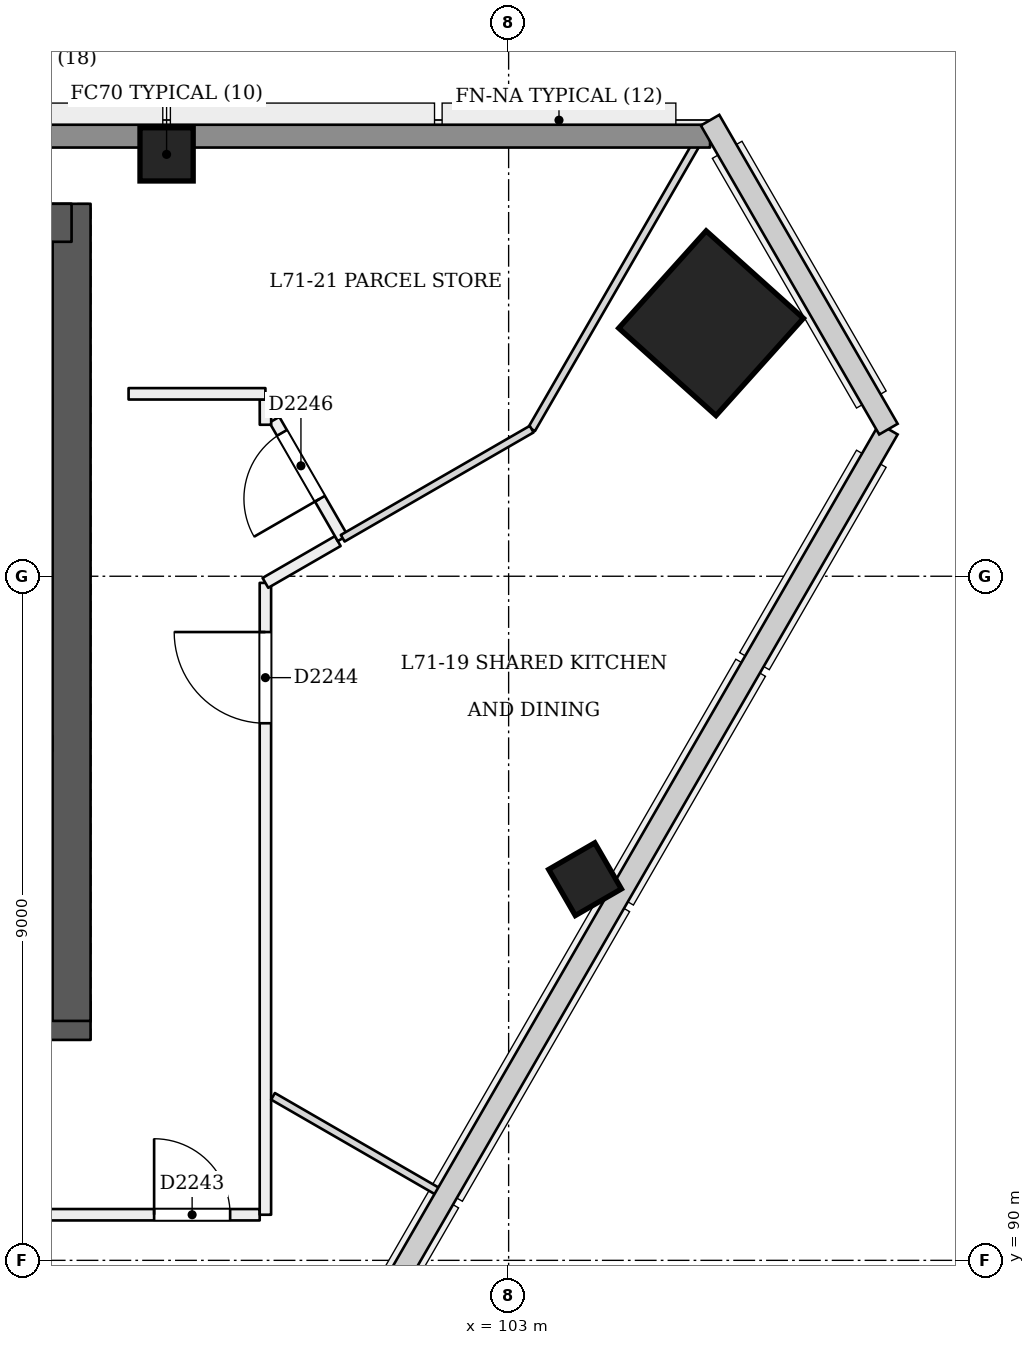
"""IFC4 building model, lengths in metres.
Left out: names, types, materials, properties, quantities, classifications, styles, units other than length and angle.
Written with IfcOpenShell. Run it as: python <this file> out.ifc"""

import sys

from ifc_helpers import new_model, si_unit, direction, frame, frame_2d, origin, origin_2d, place, context, subcontext, project, spatial, rectangle, extrude, element, fill, save


model = new_model("IFC4")
c1 = context("Model", 3, precision=1e-05, world=origin(), true_north=direction((0.0, 1.0)))
c2 = subcontext(c1, "Body", "Model", "MODEL_VIEW")
j1 = project(units=[si_unit("LENGTHUNIT", "METRE"), si_unit("PLANEANGLEUNIT", "RADIAN")], contexts=[c1])
p1 = place(None, origin())
s1 = spatial("IfcSite", under=j1, at=p1, CompositionType="ELEMENT")
p2 = place(p1, origin())
s2 = spatial("IfcBuilding", under=s1, at=p2, CompositionType="ELEMENT")
p3 = place(p2, frame((0.0, 0.0, 275.2)))
s3 = spatial("IfcBuildingStorey", under=s2, at=p3, CompositionType="ELEMENT", Elevation=275.2)
p4 = place(p3, frame((72.75, 93.15, 0.0), z_axis=(0.0, 0.0, 1.0), x_axis=(1.0, 0.0, 0.0)))
e1 = element("IfcWall", 1, at=p4, inside=s3, PredefinedType="SHEAR", context=c2, shape_type="SweptSolid", body=[
    extrude(rectangle(XDim=24.75, YDim=0.5, at=frame_2d((12.375, 0.0))), origin(), (0.0, 0.0, 1.0), 3.6),
])
p5 = place(p4, frame((1.05, 0.0, 0.0)))
e2 = element("IfcOpeningElement", 2, at=p5, cuts=e1, PredefinedType="OPENING", context=c2, shape_type="SweptSolid", body=[
    extrude(rectangle(XDim=1.2, YDim=2.1, at=frame_2d((0.6, 1.05))), frame((0.0, 0.26, 0.0), z_axis=(0.0, -1.0, 0.0), x_axis=(1.0, 0.0, 0.0)), (0.0, 0.0, 1.0), 0.521),
])
p6 = place(p4, frame((3.25, 0.0, 0.0)))
e3 = element("IfcOpeningElement", 3, at=p6, cuts=e1, PredefinedType="OPENING", context=c2, shape_type="SweptSolid", body=[
    extrude(rectangle(XDim=1.2, YDim=2.1, at=frame_2d((0.6, 1.05))), frame((0.0, 0.26, 0.0), z_axis=(0.0, -1.0, 0.0), x_axis=(1.0, 0.0, 0.0)), (0.0, 0.0, 1.0), 0.521),
])
p7 = place(p4, frame((13.25, 0.0, 0.0)))
e4 = element("IfcOpeningElement", 4, at=p7, cuts=e1, PredefinedType="OPENING", context=c2, shape_type="SweptSolid", body=[
    extrude(rectangle(XDim=1.2, YDim=2.1, at=frame_2d((0.6, 1.05))), frame((0.0, 0.26, 0.0), z_axis=(0.0, -1.0, 0.0), x_axis=(1.0, 0.0, 0.0)), (0.0, 0.0, 1.0), 0.521),
])
p8 = place(p4, frame((15.312, 0.0, 0.0)))
e5 = element("IfcOpeningElement", 5, at=p8, cuts=e1, PredefinedType="OPENING", context=c2, shape_type="SweptSolid", body=[
    extrude(rectangle(XDim=1.0, YDim=2.1, at=frame_2d((0.5, 1.05))), frame((0.0, 0.26, 0.0), z_axis=(0.0, -1.0, 0.0), x_axis=(1.0, 0.0, 0.0)), (0.0, 0.0, 1.0), 0.521),
])
p9 = place(p4, frame((17.55, 0.0, 0.0)))
e6 = element("IfcOpeningElement", 6, at=p9, cuts=e1, PredefinedType="OPENING", context=c2, shape_type="SweptSolid", body=[
    extrude(rectangle(XDim=1.0, YDim=2.1, at=frame_2d((0.5, 1.05))), frame((0.0, 0.26, 0.0), z_axis=(0.0, -1.0, 0.0), x_axis=(1.0, 0.0, 0.0)), (0.0, 0.0, 1.0), 0.521),
])
p10 = place(p4, frame((20.1, 0.0, 0.0)))
e7 = element("IfcOpeningElement", 7, at=p10, cuts=e1, PredefinedType="OPENING", context=c2, shape_type="SweptSolid", body=[
    extrude(rectangle(XDim=1.0, YDim=2.1, at=frame_2d((0.5, 1.05))), frame((0.0, 0.26, 0.0), z_axis=(0.0, -1.0, 0.0), x_axis=(1.0, 0.0, 0.0)), (0.0, 0.0, 1.0), 0.521),
])
p11 = place(p4, frame((22.587, 0.0, 0.0)))
e8 = element("IfcOpeningElement", 8, at=p11, cuts=e1, PredefinedType="OPENING", context=c2, shape_type="SweptSolid", body=[
    extrude(rectangle(XDim=1.0, YDim=2.1, at=frame_2d((0.5, 1.05))), frame((0.0, 0.26, 0.0), z_axis=(0.0, -1.0, 0.0), x_axis=(1.0, 0.0, 0.0)), (0.0, 0.0, 1.0), 0.521),
])
p12 = place(p3, frame((97.25, 93.15, 0.0), z_axis=(0.0, 0.0, 1.0), x_axis=(0.0, 1.0, 0.0)))
e9 = element("IfcWall", 9, at=p12, inside=s3, PredefinedType="SHEAR", context=c2, shape_type="SweptSolid", body=[
    extrude(rectangle(XDim=10.75, YDim=0.5, at=frame_2d((5.375, 0.0))), origin(), (0.0, 0.0, 1.0), 3.6),
])
p13 = place(p3, frame((97.25, 103.65, 0.0), z_axis=(0.0, 0.0, 1.0), x_axis=(-1.0, 0.0, 0.0)))
e10 = element("IfcWall", 10, at=p13, inside=s3, PredefinedType="SHEAR", context=c2, shape_type="SweptSolid", body=[
    extrude(rectangle(XDim=24.75, YDim=0.5, at=frame_2d((12.375, 0.0))), origin(), (0.0, 0.0, 1.0), 3.6),
])
p14 = place(p3, frame((105.698, 102.318, 0.0), z_axis=(-0.028401796786, 0.009286506348, 0.999553449666), x_axis=(0.498883874229, -0.866383828461, 0.022224801831)))
e11 = element("IfcColumn", 11, at=p14, inside=s3, PredefinedType="COLUMN", context=c2, shape_type="SweptSolid", body=[
    extrude(rectangle(XDim=1.72, YDim=1.72, at=origin_2d()), origin(), (0.0, 0.0, 1.0), 3.602),
])
p15 = place(p3, frame((98.5, 104.55, 0.0), z_axis=(0.0, 0.0, 1.0), x_axis=(1.0, 0.0, 0.0)))
e12 = element("IfcColumn", 12, at=p15, inside=s3, PredefinedType="COLUMN", context=c2, shape_type="SweptSolid", body=[
    extrude(rectangle(XDim=0.7, YDim=0.7, at=origin_2d()), origin(), (0.0, 0.0, 1.0), 3.6),
])
p16 = place(p3, frame((104.032, 94.968, -0.021), z_axis=(-0.022221406801, 0.038413224561, 0.999014831351), x_axis=(-0.499512955973, -0.866022210505, 0.022188684646)))
e13 = element("IfcColumn", 13, at=p16, inside=s3, PredefinedType="COLUMN", context=c2, shape_type="SweptSolid", body=[
    extrude(rectangle(XDim=0.7, YDim=0.7, at=origin_2d()), origin(), (0.0, 0.0, 1.0), 3.604),
])
p17 = place(p3, frame((94.524, 90.6, 0.0), z_axis=(0.0, 0.0, 1.0), x_axis=(1.0, 0.0, 0.0)))
e14 = element("IfcWall", 14, at=p17, inside=s3, PredefinedType="PARTITIONING", context=c2, shape_type="SweptSolid", body=[
    extrude(rectangle(XDim=5.201, YDim=0.15, at=frame_2d((2.601, 0.0))), origin(), (0.0, 0.0, 1.0), 3.2),
])
p18 = place(p17, frame((3.812, 0.0, 0.0)))
e15 = element("IfcOpeningElement", 15, at=p18, cuts=e14, PredefinedType="OPENING", context=c2, shape_type="SweptSolid", body=[
    extrude(rectangle(XDim=1.0, YDim=2.1, at=frame_2d((0.5, 1.05))), frame((0.0, 0.085, 0.0), z_axis=(0.0, -1.0, 0.0), x_axis=(1.0, 0.0, 0.0)), (0.0, 0.0, 1.0), 0.171),
])
p19 = place(p3, frame((99.8, 90.6, 0.0), z_axis=(0.0, 0.0, 1.0), x_axis=(0.0, 1.0, 0.0)))
e16 = element("IfcWall", 16, at=p19, inside=s3, PredefinedType="PARTITIONING", context=c2, shape_type="SweptSolid", body=[
    extrude(rectangle(XDim=8.313, YDim=0.15, at=frame_2d((4.156, 0.0))), origin(), (0.0, 0.0, 1.0), 3.2),
])
p20 = place(p19, frame((6.466, 0.0, 0.0)))
e17 = element("IfcOpeningElement", 17, at=p20, cuts=e16, PredefinedType="OPENING", context=c2, shape_type="SweptSolid", body=[
    extrude(rectangle(XDim=1.2, YDim=2.1, at=frame_2d((0.6, 1.05))), frame((0.0, 0.085, 0.0), z_axis=(0.0, -1.0, 0.0), x_axis=(1.0, 0.0, 0.0)), (0.0, 0.0, 1.0), 0.171),
])
p21 = place(p3, frame((99.8, 98.913, 0.0), z_axis=(0.0, 0.0, 1.0), x_axis=(0.866089444669, 0.499889061526, 0.0)))
e18 = element("IfcWall", 18, at=p21, inside=s3, PredefinedType="PARTITIONING", context=c2, shape_type="SweptSolid", body=[
    extrude(rectangle(XDim=1.099, YDim=0.15, at=frame_2d((0.55, 0.0))), origin(), (0.0, 0.0, 1.0), 3.2),
])
p22 = place(p3, frame((100.817, 99.5, 0.0), z_axis=(0.0, 0.0, 1.0), x_axis=(-0.499538486351, 0.866291694901, 0.0)))
e19 = element("IfcWall", 19, at=p22, inside=s3, PredefinedType="PARTITIONING", context=c2, shape_type="SweptSolid", body=[
    extrude(rectangle(XDim=1.8, YDim=0.15, at=frame_2d((0.9, 0.0))), origin(), (0.0, 0.0, 1.0), 3.2),
])
p23 = place(p22, frame((0.6, 0.0, 0.0)))
e20 = element("IfcOpeningElement", 20, at=p23, cuts=e19, PredefinedType="OPENING", context=c2, shape_type="SweptSolid", body=[
    extrude(rectangle(XDim=1.0, YDim=2.1, at=frame_2d((0.5, 1.05))), frame((0.0, 0.085, 0.0), z_axis=(0.0, -1.0, 0.0), x_axis=(1.0, 0.0, 0.0)), (0.0, 0.0, 1.0), 0.171),
])
p24 = place(p3, frame((99.801, 100.993, 0.0), z_axis=(0.0, 0.0, 1.0), x_axis=(-0.002205876986, 0.99999756705, 0.0)))
e21 = element("IfcWall", 21, at=p24, inside=s3, PredefinedType="PARTITIONING", context=c2, shape_type="SweptSolid", body=[
    extrude(rectangle(XDim=0.332, YDim=0.15, at=frame_2d((0.166, 0.0))), origin(), (0.0, 0.0, 1.0), 3.2),
])
p25 = place(p3, frame((99.8, 101.4, 0.0), z_axis=(0.0, 0.0, 1.0), x_axis=(-1.0, 0.0, 0.0)))
e22 = element("IfcWall", 22, at=p25, inside=s3, PredefinedType="PARTITIONING", context=c2, shape_type="SweptSolid", body=[
    extrude(rectangle(XDim=1.8, YDim=0.15, at=frame_2d((0.9, 0.0))), origin(), (0.0, 0.0, 1.0), 3.2),
])
p26 = place(p3, frame((99.835, 86.999, 0.0), z_axis=(0.0, 0.0, 1.0), x_axis=(-0.866025537322, 0.499999768706, 0.0)))
e23 = element("IfcWall", 23, at=p26, inside=s3, PredefinedType="PARTITIONING", context=c2, shape_type="SweptSolid", body=[
    extrude(rectangle(XDim=6.325, YDim=0.1, at=frame_2d((3.163, 0.0))), origin(), (0.0, 0.0, 1.0), 2.7),
])
p27 = place(p3, frame((102.103, 90.886, 0.0), z_axis=(0.0, 0.0, 1.0), x_axis=(-0.866060904967, 0.499938505106, 0.0)))
e24 = element("IfcWall", 24, at=p27, inside=s3, PredefinedType="PARTITIONING", context=c2, shape_type="SweptSolid", body=[
    extrude(rectangle(XDim=2.543, YDim=0.1, at=frame_2d((1.271, 0.0))), origin(), (0.0, 0.0, 1.0), 2.7),
])
p28 = place(p3, frame((105.592, 104.9, 0.0), z_axis=(0.0, 0.0, 1.0), x_axis=(-0.500016357846, -0.866015959371, 0.0)))
e25 = element("IfcWall", 25, at=p28, inside=s3, PredefinedType="PARTITIONING", context=c2, shape_type="SweptSolid", body=[
    extrude(rectangle(XDim=4.578, YDim=0.1, at=frame_2d((2.289, 0.0))), origin(), (0.0, 0.0, 1.0), 2.7),
])
p29 = place(p3, frame((103.303, 100.935, 0.0), z_axis=(0.0, 0.0, 1.0), x_axis=(-0.866031214595, -0.499989935246, 0.0)))
e26 = element("IfcWall", 26, at=p29, inside=s3, PredefinedType="PARTITIONING", context=c2, shape_type="SweptSolid", body=[
    extrude(rectangle(XDim=2.871, YDim=0.1, at=frame_2d((1.435, 0.0))), origin(), (0.0, 0.0, 1.0), 3.2),
])
p30 = place(p3, frame((64.35, 104.79, 0.0), z_axis=(0.0, 0.0, 1.0), x_axis=(1.0, 0.0, 0.0)))
e27 = element("IfcWall", 27, at=p30, inside=s3, PredefinedType="SOLIDWALL", context=c2, shape_type="SweptSolid", body=[
    extrude(rectangle(XDim=41.3, YDim=0.3, at=frame_2d((20.65, 0.0))), origin(), (0.0, 0.0, 1.0), 2.7),
])
p31 = place(p18, origin())
e28 = element("IfcDoor", 28, at=p31, inside=s3, OperationType="SINGLE_SWING_LEFT", PredefinedType="NOTDEFINED", context=c2, shape_type="SweptSolid", body=[
    extrude(rectangle(XDim=1.0, YDim=2.1, at=frame_2d((0.5, 1.05))), frame((0.0, 0.025, 0.0), z_axis=(0.0, -1.0, 0.0), x_axis=(1.0, 0.0, 0.0)), (0.0, 0.0, 1.0), 0.05),
])
fill(e15, e28)
p32 = place(p20, origin())
e29 = element("IfcDoor", 29, at=p32, inside=s3, OperationType="SINGLE_SWING_RIGHT", PredefinedType="NOTDEFINED", context=c2, shape_type="SweptSolid", body=[
    extrude(rectangle(XDim=1.2, YDim=2.1, at=frame_2d((0.6, 1.05))), frame((0.0, 0.025, 0.0), z_axis=(0.0, -1.0, 0.0), x_axis=(1.0, 0.0, 0.0)), (0.0, 0.0, 1.0), 0.05),
])
fill(e17, e29)
p33 = place(p23, origin())
e30 = element("IfcDoor", 30, at=p33, inside=s3, OperationType="SINGLE_SWING_LEFT", PredefinedType="NOTDEFINED", context=c2, shape_type="SweptSolid", body=[
    extrude(rectangle(XDim=1.0, YDim=2.1, at=frame_2d((0.5, 1.05))), frame((0.0, 0.025, 0.0), z_axis=(0.0, -1.0, 0.0), x_axis=(1.0, 0.0, 0.0)), (0.0, 0.0, 1.0), 0.05),
])
fill(e20, e30)
save(model, sys.argv[1])
